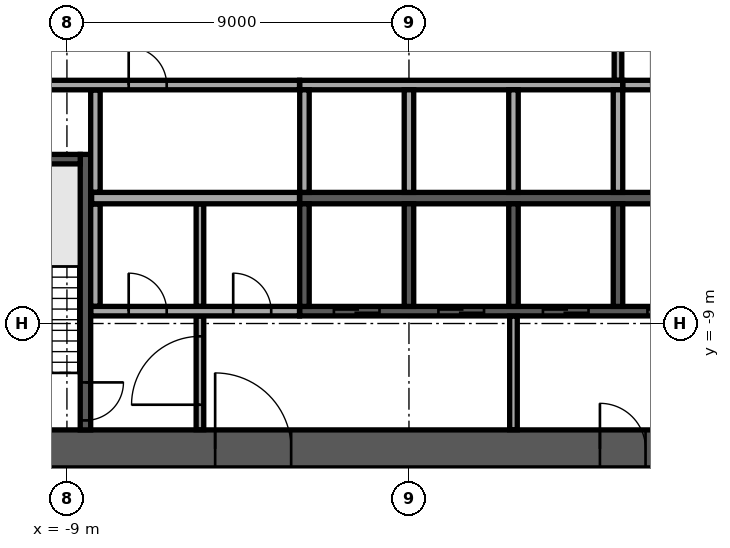
"""IFC4 building model, lengths in metres.
Left out: names, types, materials, properties, quantities, classifications, styles, units other than length and angle.
Written with IfcOpenShell. Run it as: python <this file> out.ifc"""

import sys

from ifc_helpers import new_model, si_unit, direction, frame, frame_2d, origin, place, context, subcontext, project, spatial, rectangle, extrude, element, fill, save


model = new_model("IFC4")
c1 = context("Model", 3, precision=1e-05, world=origin(), true_north=direction((0.0, 1.0)))
c2 = subcontext(c1, "Body", "Model", "MODEL_VIEW")
j1 = project(units=[si_unit("LENGTHUNIT", "METRE"), si_unit("PLANEANGLEUNIT", "RADIAN")], contexts=[c1])
p1 = place(None, origin())
s1 = spatial("IfcSite", under=j1, at=p1, CompositionType="ELEMENT")
p2 = place(p1, origin())
s2 = spatial("IfcBuilding", under=s1, at=p2, CompositionType="ELEMENT")
p3 = place(p2, frame((0.0, 0.0, 163.7)))
s3 = spatial("IfcBuildingStorey", under=s2, at=p3, CompositionType="ELEMENT", Elevation=163.7)
p4 = place(p3, frame((-12.8, -12.3, 0.0), z_axis=(0.0, 0.0, 1.0), x_axis=(1.0, 0.0, 0.0)))
e1 = element("IfcWall", 1, at=p4, inside=s3, PredefinedType="SHEAR", context=c2, shape_type="SweptSolid", body=[
    extrude(rectangle(XDim=25.6, YDim=1.0, at=frame_2d((12.8, 0.0))), origin(), (0.0, 0.0, 1.0), 3.6),
])
p5 = place(p4, frame((7.7, 0.0, 0.0)))
e2 = element("IfcOpeningElement", 2, at=p5, cuts=e1, PredefinedType="OPENING", context=c2, shape_type="SweptSolid", body=[
    extrude(rectangle(XDim=2.0, YDim=2.1, at=frame_2d((1.0, 1.05))), frame((0.0, 0.51, 0.0), z_axis=(0.0, -1.0, 0.0), x_axis=(1.0, 0.0, 0.0)), (0.0, 0.0, 1.0), 1.02),
])
p6 = place(p4, frame((17.825, 0.0, 0.0)))
e3 = element("IfcOpeningElement", 3, at=p6, cuts=e1, PredefinedType="OPENING", context=c2, shape_type="SweptSolid", body=[
    extrude(rectangle(XDim=1.2, YDim=2.1, at=frame_2d((0.6, 1.05))), frame((0.0, 0.51, 0.0), z_axis=(0.0, -1.0, 0.0), x_axis=(1.0, 0.0, 0.0)), (0.0, 0.0, 1.0), 1.02),
])
p7 = place(p4, frame((1.975, 0.0, 0.0)))
e4 = element("IfcOpeningElement", 4, at=p7, cuts=e1, PredefinedType="OPENING", context=c2, shape_type="SweptSolid", body=[
    extrude(rectangle(XDim=1.2, YDim=2.1, at=frame_2d((0.6, 1.05))), frame((0.0, 0.51, 0.0), z_axis=(0.0, -1.0, 0.0), x_axis=(1.0, 0.0, 0.0)), (0.0, 0.0, 1.0), 1.02),
])
p8 = place(p4, frame((22.425, 0.0, 0.0)))
e5 = element("IfcOpeningElement", 5, at=p8, cuts=e1, PredefinedType="OPENING", context=c2, shape_type="SweptSolid", body=[
    extrude(rectangle(XDim=1.2, YDim=2.1, at=frame_2d((0.6, 1.05))), frame((0.0, 0.51, 0.0), z_axis=(0.0, -1.0, 0.0), x_axis=(1.0, 0.0, 0.0)), (0.0, 0.0, 1.0), 1.02),
])
p9 = place(p3, frame((-2.875, -5.7, 0.0), z_axis=(0.0, 0.0, 1.0), x_axis=(1.0, 0.0, 0.0)))
e6 = element("IfcWall", 6, at=p9, inside=s3, PredefinedType="SOLIDWALL", context=c2, shape_type="SweptSolid", body=[
    extrude(rectangle(XDim=11.25, YDim=0.3, at=frame_2d((5.625, 0.0))), origin(), (0.0, 0.0, 1.0), 3.6),
])
p10 = place(p3, frame((-2.875, -2.725, 0.0), z_axis=(0.0, 0.0, 1.0), x_axis=(1.0, 0.0, 0.0)))
e7 = element("IfcWall", 7, at=p10, inside=s3, PredefinedType="SOLIDWALL", context=c2, shape_type="SweptSolid", body=[
    extrude(rectangle(XDim=8.5, YDim=0.25, at=frame_2d((4.25, 0.0))), origin(), (0.0, 0.0, 1.0), 3.6),
])
for number, where, z_axis, x_axis in (
    (8, (-2.75, -5.55, 0.0), (0.0, 0.0, 1.0), (0.0, 1.0, 0.0)),
    (9, (0.0, -5.55, 0.0), (0.0, 0.0, 1.0), (0.0, 1.0, 0.0)),
    (10, (2.75, -5.55, 0.0), (0.0, 0.0, 1.0), (0.0, 1.0, 0.0)),
    (11, (5.5, -5.55, 0.0), (0.0, 0.0, 1.0), (0.0, 1.0, 0.0)),
):
    element("IfcWall", number, at=place(p3, frame(where, z_axis=z_axis, x_axis=x_axis)), inside=s3, PredefinedType="SOLIDWALL", context=c2, shape_type="SweptSolid", body=[
        extrude(rectangle(XDim=2.7, YDim=0.25, at=frame_2d((1.35, 0.0))), origin(), (0.0, 0.0, 1.0), 3.6),
    ])
p11 = place(p3, frame((-2.875, -8.675, 0.0), z_axis=(0.0, 0.0, 1.0), x_axis=(1.0, 0.0, 0.0)))
e12 = element("IfcWall", 12, at=p11, inside=s3, PredefinedType="SOLIDWALL", context=c2, shape_type="SweptSolid", body=[
    extrude(rectangle(XDim=11.25, YDim=0.25, at=frame_2d((5.625, 0.0))), origin(), (0.0, 0.0, 1.0), 3.6),
])
p12 = place(p11, frame((0.9, 0.0, 0.0)))
e13 = element("IfcOpeningElement", 13, at=p12, cuts=e12, PredefinedType="OPENING", context=c2, shape_type="SweptSolid", body=[
    extrude(rectangle(XDim=1.2, YDim=2.1, at=frame_2d((0.6, 1.05))), frame((0.0, 0.135, 0.0), z_axis=(0.0, -1.0, 0.0), x_axis=(1.0, 0.0, 0.0)), (0.0, 0.0, 1.0), 0.27),
])
p13 = place(p11, frame((3.65, 0.0, 0.0)))
e14 = element("IfcOpeningElement", 14, at=p13, cuts=e12, PredefinedType="OPENING", context=c2, shape_type="SweptSolid", body=[
    extrude(rectangle(XDim=1.2, YDim=2.1, at=frame_2d((0.6, 1.05))), frame((0.0, 0.135, 0.0), z_axis=(0.0, -1.0, 0.0), x_axis=(1.0, 0.0, 0.0)), (0.0, 0.0, 1.0), 0.27),
])
p14 = place(p11, frame((6.4, 0.0, 0.0)))
e15 = element("IfcOpeningElement", 15, at=p14, cuts=e12, PredefinedType="OPENING", context=c2, shape_type="SweptSolid", body=[
    extrude(rectangle(XDim=1.2, YDim=2.1, at=frame_2d((0.6, 1.05))), frame((0.0, 0.135, 0.0), z_axis=(0.0, -1.0, 0.0), x_axis=(1.0, 0.0, 0.0)), (0.0, 0.0, 1.0), 0.27),
])
p15 = place(p11, frame((9.15, 0.0, 0.0)))
e16 = element("IfcOpeningElement", 16, at=p15, cuts=e12, PredefinedType="OPENING", context=c2, shape_type="SweptSolid", body=[
    extrude(rectangle(XDim=1.2, YDim=2.1, at=frame_2d((0.6, 1.05))), frame((0.0, 0.135, 0.0), z_axis=(0.0, -1.0, 0.0), x_axis=(1.0, 0.0, 0.0)), (0.0, 0.0, 1.0), 0.27),
])
for number, where, z_axis, x_axis in (
    (17, (-2.75, -8.55, 0.0), (0.0, 0.0, 1.0), (0.0, 1.0, 0.0)),
    (18, (0.0, -8.55, 0.0), (0.0, 0.0, 1.0), (0.0, 1.0, 0.0)),
    (19, (2.75, -8.55, 0.0), (0.0, 0.0, 1.0), (0.0, 1.0, 0.0)),
    (20, (5.5, -8.55, 0.0), (0.0, 0.0, 1.0), (0.0, 1.0, 0.0)),
):
    element("IfcWall", number, at=place(p3, frame(where, z_axis=z_axis, x_axis=x_axis)), inside=s3, PredefinedType="SOLIDWALL", context=c2, shape_type="SweptSolid", body=[
        extrude(rectangle(XDim=2.7, YDim=0.25, at=frame_2d((1.35, 0.0))), origin(), (0.0, 0.0, 1.0), 3.6),
    ])
p16 = place(p3, frame((-8.512, -4.55, 0.0), z_axis=(0.0, 0.0, 1.0), x_axis=(0.0, -1.0, 0.0)))
e21 = element("IfcWall", 21, at=p16, inside=s3, PredefinedType="SOLIDWALL", context=c2, shape_type="SweptSolid", body=[
    extrude(rectangle(XDim=7.25, YDim=0.275, at=frame_2d((3.625, 0.0))), origin(), (0.0, 0.0, 1.0), 3.6),
])
p17 = place(p16, frame((6.0, 0.0, 0.0)))
e22 = element("IfcOpeningElement", 22, at=p17, cuts=e21, PredefinedType="OPENING", context=c2, shape_type="SweptSolid", body=[
    extrude(rectangle(XDim=1.0, YDim=2.1, at=frame_2d((0.5, 1.05))), frame((0.0, 0.147, 0.0), z_axis=(0.0, -1.0, 0.0), x_axis=(1.0, 0.0, 0.0)), (0.0, 0.0, 1.0), 0.295),
])
p18 = place(p3, frame((-8.65, -4.675, 0.0), z_axis=(0.0, 0.0, 1.0), x_axis=(-1.0, 0.0, 0.0)))
e23 = element("IfcWall", 23, at=p18, inside=s3, PredefinedType="SOLIDWALL", context=c2, shape_type="SweptSolid", body=[
    extrude(rectangle(XDim=3.15, YDim=0.25, at=frame_2d((1.575, 0.0))), origin(), (0.0, 0.0, 1.0), 3.6),
])
p19 = place(p3, frame((-5.5, -11.795, 0.0), z_axis=(0.0, 0.0, 1.0), x_axis=(0.0, 1.0, 0.0)))
e24 = element("IfcWall", 24, at=p19, inside=s3, PredefinedType="PARTITIONING", context=c2, shape_type="SweptSolid", body=[
    extrude(rectangle(XDim=2.99, YDim=0.2, at=frame_2d((1.495, 0.0))), origin(), (0.0, 0.0, 1.0), 3.6),
])
p20 = place(p19, frame((0.657, 0.0, 0.0)))
e25 = element("IfcOpeningElement", 25, at=p20, cuts=e24, PredefinedType="OPENING", context=c2, shape_type="SweptSolid", body=[
    extrude(rectangle(XDim=1.8, YDim=2.1, at=frame_2d((0.9, 1.05))), frame((0.0, 0.11, 0.0), z_axis=(0.0, -1.0, 0.0), x_axis=(1.0, 0.0, 0.0)), (0.0, 0.0, 1.0), 0.22),
])
p21 = place(p3, frame((2.75, -11.795, 0.0), z_axis=(0.0, 0.0, 1.0), x_axis=(0.0, 1.0, 0.0)))
e26 = element("IfcWall", 26, at=p21, inside=s3, PredefinedType="PARTITIONING", context=c2, shape_type="SweptSolid", body=[
    extrude(rectangle(XDim=2.99, YDim=0.2, at=frame_2d((1.495, 0.0))), origin(), (0.0, 0.0, 1.0), 3.6),
])
p22 = place(p3, frame((-8.37, -8.675, 0.0), z_axis=(0.0, 0.0, 1.0), x_axis=(1.0, 0.0, 0.0)))
e27 = element("IfcWall", 27, at=p22, inside=s3, PredefinedType="PARTITIONING", context=c2, shape_type="SweptSolid", body=[
    extrude(rectangle(XDim=5.49, YDim=0.25, at=frame_2d((2.745, 0.0))), origin(), (0.0, 0.0, 1.0), 3.6),
])
p23 = place(p22, frame((0.995, 0.0, 0.0)))
e28 = element("IfcOpeningElement", 28, at=p23, cuts=e27, PredefinedType="OPENING", context=c2, shape_type="SweptSolid", body=[
    extrude(rectangle(XDim=1.0, YDim=2.1, at=frame_2d((0.5, 1.05))), frame((0.0, 0.135, 0.0), z_axis=(0.0, -1.0, 0.0), x_axis=(1.0, 0.0, 0.0)), (0.0, 0.0, 1.0), 0.27),
])
p24 = place(p22, frame((3.745, 0.0, 0.0)))
e29 = element("IfcOpeningElement", 29, at=p24, cuts=e27, PredefinedType="OPENING", context=c2, shape_type="SweptSolid", body=[
    extrude(rectangle(XDim=1.0, YDim=2.1, at=frame_2d((0.5, 1.05))), frame((0.0, 0.135, 0.0), z_axis=(0.0, -1.0, 0.0), x_axis=(1.0, 0.0, 0.0)), (0.0, 0.0, 1.0), 0.27),
])
p25 = place(p3, frame((-8.25, -8.545, 0.0), z_axis=(0.0, 0.0, 1.0), x_axis=(0.0, 1.0, 0.0)))
e30 = element("IfcWall", 30, at=p25, inside=s3, PredefinedType="PARTITIONING", context=c2, shape_type="SweptSolid", body=[
    extrude(rectangle(XDim=2.69, YDim=0.25, at=frame_2d((1.345, 0.0))), origin(), (0.0, 0.0, 1.0), 3.6),
])
p26 = place(p3, frame((-5.5, -8.545, 0.0), z_axis=(0.0, 0.0, 1.0), x_axis=(0.0, 1.0, 0.0)))
e31 = element("IfcWall", 31, at=p26, inside=s3, PredefinedType="PARTITIONING", context=c2, shape_type="SweptSolid", body=[
    extrude(rectangle(XDim=2.69, YDim=0.2, at=frame_2d((1.345, 0.0))), origin(), (0.0, 0.0, 1.0), 3.6),
])
p27 = place(p3, frame((-8.35, -5.7, 0.0), z_axis=(0.0, 0.0, 1.0), x_axis=(1.0, 0.0, 0.0)))
e32 = element("IfcWall", 32, at=p27, inside=s3, PredefinedType="PARTITIONING", context=c2, shape_type="SweptSolid", body=[
    extrude(rectangle(XDim=5.47, YDim=0.3, at=frame_2d((2.735, 0.0))), origin(), (0.0, 0.0, 1.0), 3.6),
])
p28 = place(p3, frame((-8.25, -5.545, 0.0), z_axis=(0.0, 0.0, 1.0), x_axis=(0.0, 1.0, 0.0)))
e33 = element("IfcWall", 33, at=p28, inside=s3, PredefinedType="PARTITIONING", context=c2, shape_type="SweptSolid", body=[
    extrude(rectangle(XDim=2.69, YDim=0.25, at=frame_2d((1.345, 0.0))), origin(), (0.0, 0.0, 1.0), 3.6),
])
p29 = place(p3, frame((-11.795, -2.725, 0.0), z_axis=(0.0, 0.0, 1.0), x_axis=(1.0, 0.0, 0.0)))
e34 = element("IfcWall", 34, at=p29, inside=s3, PredefinedType="PARTITIONING", context=c2, shape_type="SweptSolid", body=[
    extrude(rectangle(XDim=8.915, YDim=0.25, at=frame_2d((4.458, 0.0))), origin(), (0.0, 0.0, 1.0), 3.6),
])
p30 = place(p29, frame((1.295, 0.0, 0.0)))
e35 = element("IfcOpeningElement", 35, at=p30, cuts=e34, PredefinedType="OPENING", context=c2, shape_type="SweptSolid", body=[
    extrude(rectangle(XDim=1.0, YDim=2.1, at=frame_2d((0.5, 1.05))), frame((0.0, 0.135, 0.0), z_axis=(0.0, -1.0, 0.0), x_axis=(1.0, 0.0, 0.0)), (0.0, 0.0, 1.0), 0.27),
])
p31 = place(p29, frame((4.42, 0.0, 0.0)))
e36 = element("IfcOpeningElement", 36, at=p31, cuts=e34, PredefinedType="OPENING", context=c2, shape_type="SweptSolid", body=[
    extrude(rectangle(XDim=1.0, YDim=2.1, at=frame_2d((0.5, 1.05))), frame((0.0, 0.135, 0.0), z_axis=(0.0, -1.0, 0.0), x_axis=(1.0, 0.0, 0.0)), (0.0, 0.0, 1.0), 0.27),
])
p32 = place(p3, frame((5.63, -2.725, 0.0), z_axis=(0.0, 0.0, 1.0), x_axis=(1.0, 0.0, 0.0)))
e37 = element("IfcWall", 37, at=p32, inside=s3, PredefinedType="PARTITIONING", context=c2, shape_type="SweptSolid", body=[
    extrude(rectangle(XDim=6.165, YDim=0.25, at=frame_2d((3.083, 0.0))), origin(), (0.0, 0.0, 1.0), 3.6),
])
p33 = place(p32, frame((0.745, 0.0, 0.0)))
e38 = element("IfcOpeningElement", 38, at=p33, cuts=e37, PredefinedType="OPENING", context=c2, shape_type="SweptSolid", body=[
    extrude(rectangle(XDim=1.0, YDim=2.1, at=frame_2d((0.5, 1.05))), frame((0.0, 0.135, 0.0), z_axis=(0.0, -1.0, 0.0), x_axis=(1.0, 0.0, 0.0)), (0.0, 0.0, 1.0), 0.27),
])
p34 = place(p32, frame((3.92, 0.0, 0.0)))
e39 = element("IfcOpeningElement", 39, at=p34, cuts=e37, PredefinedType="OPENING", context=c2, shape_type="SweptSolid", body=[
    extrude(rectangle(XDim=0.9, YDim=2.1, at=frame_2d((0.45, 1.05))), frame((0.0, 0.135, 0.0), z_axis=(0.0, -1.0, 0.0), x_axis=(1.0, 0.0, 0.0)), (0.0, 0.0, 1.0), 0.27),
])
p35 = place(p3, frame((5.5, -2.595, 0.0), z_axis=(0.0, 0.0, 1.0), x_axis=(0.0, 1.0, 0.0)))
e40 = element("IfcWall", 40, at=p35, inside=s3, PredefinedType="PARTITIONING", context=c2, shape_type="SweptSolid", body=[
    extrude(rectangle(XDim=5.19, YDim=0.2, at=frame_2d((2.595, 0.0))), origin(), (0.0, 0.0, 1.0), 3.6),
])
p36 = place(p35, frame((1.395, 0.0, 0.0)))
e41 = element("IfcOpeningElement", 41, at=p36, cuts=e40, PredefinedType="OPENING", context=c2, shape_type="SweptSolid", body=[
    extrude(rectangle(XDim=2.4, YDim=2.4, at=frame_2d((1.2, 1.2))), frame((0.0, 0.11, 0.0), z_axis=(0.0, -1.0, 0.0), x_axis=(1.0, 0.0, 0.0)), (0.0, 0.0, 1.0), 0.22),
])
p37 = place(p3, frame((-4.784, -35.737, 0.0), z_axis=(0.0, 0.0, 1.0), x_axis=(0.809019283075, 0.587782102154, 0.0)))
e42 = element("IfcWall", 42, at=p37, inside=s3, PredefinedType="STANDARD", context=c2, shape_type="SweptSolid", body=[
    extrude(rectangle(XDim=49.751, YDim=0.6, at=frame_2d((24.875, 0.0))), origin(), (0.0, 0.0, 1.0), 3.6),
])
p38 = place(p37, frame((1.161, 0.0, 0.9)))
e43 = element("IfcOpeningElement", 43, at=p38, cuts=e42, PredefinedType="OPENING", context=c2, shape_type="SweptSolid", body=[
    extrude(rectangle(XDim=2.1, YDim=2.1, at=frame_2d((1.05, 1.05))), frame((0.0, 0.31, 0.0), z_axis=(0.0, -1.0, 0.0), x_axis=(1.0, 0.0, 0.0)), (0.0, 0.0, 1.0), 0.62),
])
p39 = place(p37, frame((5.644, 0.0, 0.9)))
e44 = element("IfcOpeningElement", 44, at=p39, cuts=e42, PredefinedType="OPENING", context=c2, shape_type="SweptSolid", body=[
    extrude(rectangle(XDim=2.1, YDim=2.1, at=frame_2d((1.05, 1.05))), frame((0.0, 0.31, 0.0), z_axis=(0.0, -1.0, 0.0), x_axis=(1.0, 0.0, 0.0)), (0.0, 0.0, 1.0), 0.62),
])
p40 = place(p37, frame((10.189, 0.0, 0.9)))
e45 = element("IfcOpeningElement", 45, at=p40, cuts=e42, PredefinedType="OPENING", context=c2, shape_type="SweptSolid", body=[
    extrude(rectangle(XDim=2.1, YDim=2.1, at=frame_2d((1.05, 1.05))), frame((0.0, 0.31, 0.0), z_axis=(0.0, -1.0, 0.0), x_axis=(1.0, 0.0, 0.0)), (0.0, 0.0, 1.0), 0.62),
])
p41 = place(p37, frame((14.735, 0.0, 0.9)))
e46 = element("IfcOpeningElement", 46, at=p41, cuts=e42, PredefinedType="OPENING", context=c2, shape_type="SweptSolid", body=[
    extrude(rectangle(XDim=2.1, YDim=2.1, at=frame_2d((1.05, 1.05))), frame((0.0, 0.31, 0.0), z_axis=(0.0, -1.0, 0.0), x_axis=(1.0, 0.0, 0.0)), (0.0, 0.0, 1.0), 0.62),
])
p42 = place(p37, frame((19.28, 0.0, 0.9)))
e47 = element("IfcOpeningElement", 47, at=p42, cuts=e42, PredefinedType="OPENING", context=c2, shape_type="SweptSolid", body=[
    extrude(rectangle(XDim=2.1, YDim=2.1, at=frame_2d((1.05, 1.05))), frame((0.0, 0.31, 0.0), z_axis=(0.0, -1.0, 0.0), x_axis=(1.0, 0.0, 0.0)), (0.0, 0.0, 1.0), 0.62),
])
p43 = place(p37, frame((23.826, 0.0, 0.9)))
e48 = element("IfcOpeningElement", 48, at=p43, cuts=e42, PredefinedType="OPENING", context=c2, shape_type="SweptSolid", body=[
    extrude(rectangle(XDim=2.1, YDim=2.1, at=frame_2d((1.05, 1.05))), frame((0.0, 0.31, 0.0), z_axis=(0.0, -1.0, 0.0), x_axis=(1.0, 0.0, 0.0)), (0.0, 0.0, 1.0), 0.62),
])
p44 = place(p37, frame((28.371, 0.0, 0.9)))
e49 = element("IfcOpeningElement", 49, at=p44, cuts=e42, PredefinedType="OPENING", context=c2, shape_type="SweptSolid", body=[
    extrude(rectangle(XDim=2.1, YDim=2.1, at=frame_2d((1.05, 1.05))), frame((0.0, 0.31, 0.0), z_axis=(0.0, -1.0, 0.0), x_axis=(1.0, 0.0, 0.0)), (0.0, 0.0, 1.0), 0.62),
])
p45 = place(p37, frame((32.917, 0.0, 0.9)))
e50 = element("IfcOpeningElement", 50, at=p45, cuts=e42, PredefinedType="OPENING", context=c2, shape_type="SweptSolid", body=[
    extrude(rectangle(XDim=2.1, YDim=2.1, at=frame_2d((1.05, 1.05))), frame((0.0, 0.31, 0.0), z_axis=(0.0, -1.0, 0.0), x_axis=(1.0, 0.0, 0.0)), (0.0, 0.0, 1.0), 0.62),
])
p46 = place(p37, frame((37.462, 0.0, 0.9)))
e51 = element("IfcOpeningElement", 51, at=p46, cuts=e42, PredefinedType="OPENING", context=c2, shape_type="SweptSolid", body=[
    extrude(rectangle(XDim=2.1, YDim=2.1, at=frame_2d((1.05, 1.05))), frame((0.0, 0.31, 0.0), z_axis=(0.0, -1.0, 0.0), x_axis=(1.0, 0.0, 0.0)), (0.0, 0.0, 1.0), 0.62),
])
p47 = place(p37, frame((42.008, 0.0, 0.9)))
e52 = element("IfcOpeningElement", 52, at=p47, cuts=e42, PredefinedType="OPENING", context=c2, shape_type="SweptSolid", body=[
    extrude(rectangle(XDim=2.1, YDim=2.1, at=frame_2d((1.05, 1.05))), frame((0.0, 0.31, 0.0), z_axis=(0.0, -1.0, 0.0), x_axis=(1.0, 0.0, 0.0)), (0.0, 0.0, 1.0), 0.62),
])
p48 = place(p37, frame((46.491, 0.0, 0.9)))
e53 = element("IfcOpeningElement", 53, at=p48, cuts=e42, PredefinedType="OPENING", context=c2, shape_type="SweptSolid", body=[
    extrude(rectangle(XDim=2.1, YDim=2.1, at=frame_2d((1.05, 1.05))), frame((0.0, 0.31, 0.0), z_axis=(0.0, -1.0, 0.0), x_axis=(1.0, 0.0, 0.0)), (0.0, 0.0, 1.0), 0.62),
])
p49 = place(p3, frame((-3.509, -26.309, 0.0), z_axis=(0.0, 0.0, 1.0), x_axis=(0.809024097608, 0.587775475407, 0.0)))
e54 = element("IfcWall", 54, at=p49, inside=s3, PredefinedType="PARTITIONING", context=c2, shape_type="SweptSolid", body=[
    extrude(rectangle(XDim=36.68, YDim=0.15, at=frame_2d((18.34, 0.0))), origin(), (0.0, 0.0, 1.0), 3.15),
])
p50 = place(p49, frame((5.361, 0.0, 0.0)))
e55 = element("IfcOpeningElement", 55, at=p50, cuts=e54, PredefinedType="OPENING", context=c2, shape_type="SweptSolid", body=[
    extrude(rectangle(XDim=1.0, YDim=2.1, at=frame_2d((0.5, 1.05))), frame((0.0, 0.085, 0.0), z_axis=(0.0, -1.0, 0.0), x_axis=(1.0, 0.0, 0.0)), (0.0, 0.0, 1.0), 0.17),
])
p51 = place(p49, frame((12.913, 0.0, 0.0)))
e56 = element("IfcOpeningElement", 56, at=p51, cuts=e54, PredefinedType="OPENING", context=c2, shape_type="SweptSolid", body=[
    extrude(rectangle(XDim=1.0, YDim=2.1, at=frame_2d((0.5, 1.05))), frame((0.0, 0.085, 0.0), z_axis=(0.0, -1.0, 0.0), x_axis=(1.0, 0.0, 0.0)), (0.0, 0.0, 1.0), 0.17),
])
p52 = place(p49, frame((27.576, 0.0, 0.0)))
e57 = element("IfcOpeningElement", 57, at=p52, cuts=e54, PredefinedType="OPENING", context=c2, shape_type="SweptSolid", body=[
    extrude(rectangle(XDim=1.0, YDim=2.1, at=frame_2d((0.5, 1.05))), frame((0.0, 0.085, 0.0), z_axis=(0.0, -1.0, 0.0), x_axis=(1.0, 0.0, 0.0)), (0.0, 0.0, 1.0), 0.17),
])
p53 = place(p5, origin())
e58 = element("IfcDoor", 58, at=p53, inside=s3, OperationType="SINGLE_SWING_LEFT", PredefinedType="DOOR", context=c2, shape_type="SweptSolid", body=[
    extrude(rectangle(XDim=2.0, YDim=2.1, at=frame_2d((1.0, 1.05))), frame((0.0, 0.025, 0.0), z_axis=(0.0, -1.0, 0.0), x_axis=(1.0, 0.0, 0.0)), (0.0, 0.0, 1.0), 0.05),
])
fill(e2, e58)
p54 = place(p6, origin())
e59 = element("IfcDoor", 59, at=p54, inside=s3, OperationType="SINGLE_SWING_LEFT", PredefinedType="DOOR", context=c2, shape_type="SweptSolid", body=[
    extrude(rectangle(XDim=1.2, YDim=2.1, at=frame_2d((0.6, 1.05))), frame((0.0, 0.025, 0.0), z_axis=(0.0, -1.0, 0.0), x_axis=(1.0, 0.0, 0.0)), (0.0, 0.0, 1.0), 0.05),
])
fill(e3, e59)
p55 = place(p12, origin())
e60 = element("IfcDoor", 60, at=p55, inside=s3, OperationType="DOUBLE_DOOR_SLIDING", PredefinedType="DOOR", context=c2, shape_type="SweptSolid", body=[
    extrude(rectangle(XDim=1.2, YDim=2.1, at=frame_2d((0.6, 1.05))), frame((0.0, 0.025, 0.0), z_axis=(0.0, -1.0, 0.0), x_axis=(1.0, 0.0, 0.0)), (0.0, 0.0, 1.0), 0.05),
])
fill(e13, e60)
p56 = place(p13, origin())
e61 = element("IfcDoor", 61, at=p56, inside=s3, OperationType="DOUBLE_DOOR_SLIDING", PredefinedType="DOOR", context=c2, shape_type="SweptSolid", body=[
    extrude(rectangle(XDim=1.2, YDim=2.1, at=frame_2d((0.6, 1.05))), frame((0.0, 0.025, 0.0), z_axis=(0.0, -1.0, 0.0), x_axis=(1.0, 0.0, 0.0)), (0.0, 0.0, 1.0), 0.05),
])
fill(e14, e61)
p57 = place(p14, origin())
e62 = element("IfcDoor", 62, at=p57, inside=s3, OperationType="DOUBLE_DOOR_SLIDING", PredefinedType="DOOR", context=c2, shape_type="SweptSolid", body=[
    extrude(rectangle(XDim=1.2, YDim=2.1, at=frame_2d((0.6, 1.05))), frame((0.0, 0.025, 0.0), z_axis=(0.0, -1.0, 0.0), x_axis=(1.0, 0.0, 0.0)), (0.0, 0.0, 1.0), 0.05),
])
fill(e15, e62)
p58 = place(p15, origin())
e63 = element("IfcDoor", 63, at=p58, inside=s3, OperationType="DOUBLE_DOOR_SLIDING", PredefinedType="DOOR", context=c2, shape_type="SweptSolid", body=[
    extrude(rectangle(XDim=1.2, YDim=2.1, at=frame_2d((0.6, 1.05))), frame((0.0, 0.025, 0.0), z_axis=(0.0, -1.0, 0.0), x_axis=(1.0, 0.0, 0.0)), (0.0, 0.0, 1.0), 0.05),
])
fill(e16, e63)
p59 = place(p17, origin())
e64 = element("IfcDoor", 64, at=p59, inside=s3, OperationType="SINGLE_SWING_LEFT", PredefinedType="DOOR", context=c2, shape_type="SweptSolid", body=[
    extrude(rectangle(XDim=1.0, YDim=2.1, at=frame_2d((0.5, 1.05))), frame((0.0, 0.025, 0.0), z_axis=(0.0, -1.0, 0.0), x_axis=(1.0, 0.0, 0.0)), (0.0, 0.0, 1.0), 0.05),
])
fill(e22, e64)
p60 = place(p23, origin())
e65 = element("IfcDoor", 65, at=p60, inside=s3, OperationType="SINGLE_SWING_LEFT", PredefinedType="DOOR", context=c2, shape_type="SweptSolid", body=[
    extrude(rectangle(XDim=1.0, YDim=2.1, at=frame_2d((0.5, 1.05))), frame((0.0, 0.025, 0.0), z_axis=(0.0, -1.0, 0.0), x_axis=(1.0, 0.0, 0.0)), (0.0, 0.0, 1.0), 0.05),
])
fill(e28, e65)
p61 = place(p24, origin())
e66 = element("IfcDoor", 66, at=p61, inside=s3, OperationType="SINGLE_SWING_LEFT", PredefinedType="DOOR", context=c2, shape_type="SweptSolid", body=[
    extrude(rectangle(XDim=1.0, YDim=2.1, at=frame_2d((0.5, 1.05))), frame((0.0, 0.025, 0.0), z_axis=(0.0, -1.0, 0.0), x_axis=(1.0, 0.0, 0.0)), (0.0, 0.0, 1.0), 0.05),
])
fill(e29, e66)
p62 = place(p31, origin())
e67 = element("IfcDoor", 67, at=p62, inside=s3, OperationType="SINGLE_SWING_LEFT", PredefinedType="DOOR", context=c2, shape_type="SweptSolid", body=[
    extrude(rectangle(XDim=1.0, YDim=2.1, at=frame_2d((0.5, 1.05))), frame((0.0, 0.025, 0.0), z_axis=(0.0, -1.0, 0.0), x_axis=(1.0, 0.0, 0.0)), (0.0, 0.0, 1.0), 0.05),
])
fill(e36, e67)
p63 = place(p20, origin())
e68 = element("IfcDoor", 68, at=p63, inside=s3, OperationType="SINGLE_SWING_LEFT", PredefinedType="DOOR", context=c2, shape_type="SweptSolid", body=[
    extrude(rectangle(XDim=1.8, YDim=2.1, at=frame_2d((0.9, 1.05))), frame((0.0, 0.025, 0.0), z_axis=(0.0, -1.0, 0.0), x_axis=(1.0, 0.0, 0.0)), (0.0, 0.0, 1.0), 0.05),
])
fill(e25, e68)
save(model, sys.argv[1])
